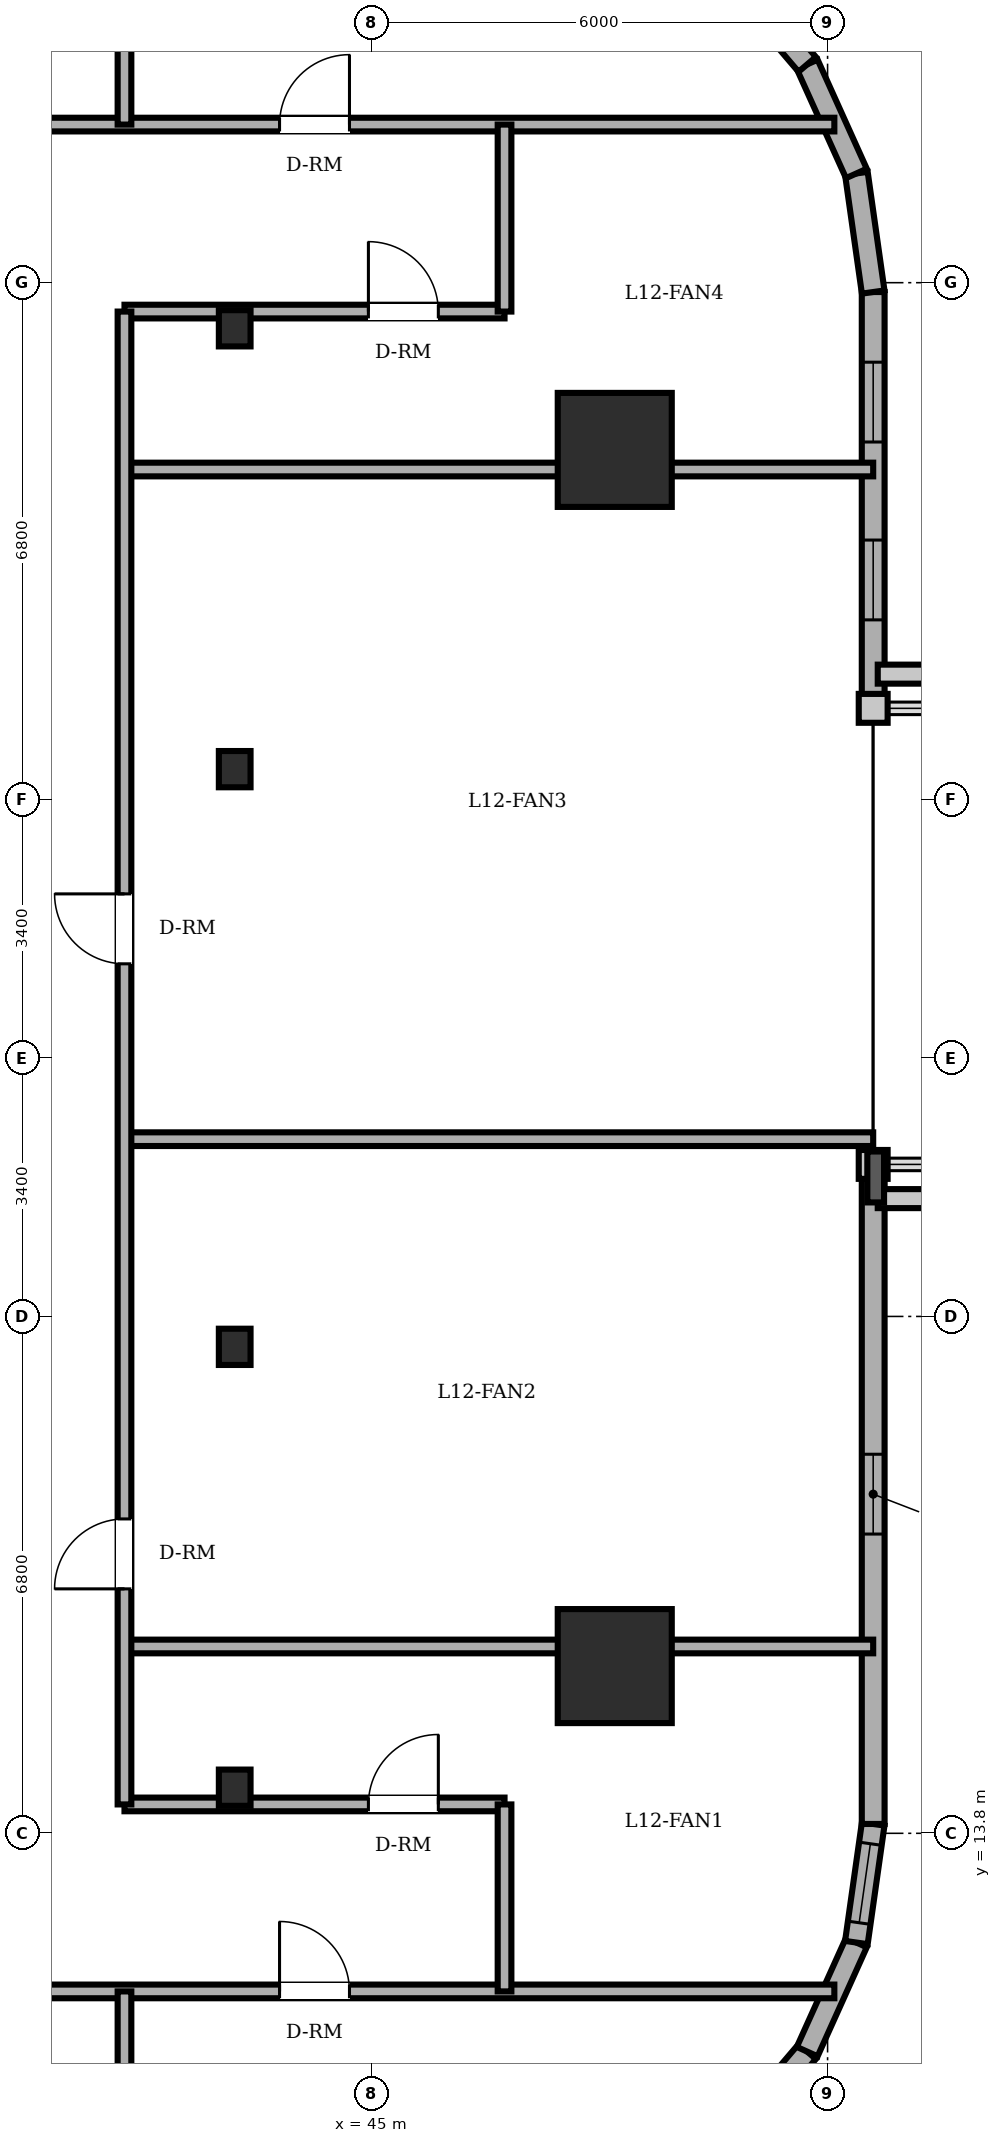
"""IFC4 building model, lengths in metres.
Left out: names, types, materials, properties, quantities, classifications, styles, units other than length and angle.
Written with IfcOpenShell. Run it as: python <this file> out.ifc"""

import sys

from ifc_helpers import new_model, si_unit, direction, frame, frame_2d, origin, origin_2d, place, context, subcontext, project, spatial, rectangle, circle, i_section, extrude, element, fill, save


model = new_model("IFC4")
c1 = context("Model", 3, precision=1e-05, world=origin(), true_north=direction((0.0, 1.0)))
c2 = subcontext(c1, "Body", "Model", "MODEL_VIEW")
j1 = project(units=[si_unit("LENGTHUNIT", "METRE"), si_unit("PLANEANGLEUNIT", "RADIAN")], contexts=[c1])
p1 = place(None, origin())
s1 = spatial("IfcSite", under=j1, at=p1, CompositionType="ELEMENT")
p2 = place(p1, origin())
s2 = spatial("IfcBuilding", under=s1, at=p2, CompositionType="ELEMENT")
p3 = place(p2, frame((0.0, 0.0, 46.8)))
s3 = spatial("IfcBuildingStorey", under=s2, at=p3, CompositionType="ELEMENT", Elevation=46.8)
for number, where, z_axis, x_axis in (
    (1, (48.2, 16.0, 0.0), (0.0, 0.0, 1.0), (1.0, 0.0, 0.0)),
    (2, (48.2, 32.0, 0.0), (0.0, 0.0, 1.0), (1.0, 0.0, 0.0)),
):
    element("IfcColumn", number, at=place(p3, frame(where, z_axis=z_axis, x_axis=x_axis)), inside=s3, PredefinedType="COLUMN", context=c2, shape_type="SweptSolid", body=[
        extrude(circle(Radius=0.75, at=origin_2d()), origin(), (0.0, 0.0, 1.0), 3.6),
    ])
for number, where, z_axis, x_axis in (
    (3, (43.2, 14.4, 0.0), (0.0, 0.0, 1.0), (1.0, 0.0, 0.0)),
    (4, (43.2, 20.2, 0.0), (0.0, 0.0, 1.0), (1.0, 0.0, 0.0)),
    (5, (43.2, 27.8, 0.0), (0.0, 0.0, 1.0), (1.0, 0.0, 0.0)),
    (6, (43.2, 33.6, 0.0), (0.0, 0.0, 1.0), (1.0, 0.0, 0.0)),
):
    element("IfcColumn", number, at=place(p3, frame(where, z_axis=z_axis, x_axis=x_axis)), inside=s3, PredefinedType="COLUMN", context=c2, shape_type="SweptSolid", body=[
        extrude(i_section(OverallWidth=0.417, OverallDepth=0.477, WebThickness=0.036, FlangeThickness=0.057, FilletRadius=0.015, at=origin_2d()), origin(), (0.0, 0.0, 1.0), 3.6),
    ])
p4 = place(p3, frame((49.71, 9.728, 0.0), z_axis=(0.0, 0.0, 1.0), x_axis=(0.648389989909, 0.7613083613, 0.0)))
e7 = element("IfcWall", 7, at=p4, inside=s3, PredefinedType="SOLIDWALL", context=c2, shape_type="SweptSolid", body=[
    extrude(rectangle(XDim=1.576, YDim=0.3, at=frame_2d((0.788, 0.0))), origin(), (0.0, 0.0, 1.0), 3.4),
])
p5 = place(p3, frame((50.732, 10.928, 0.0), z_axis=(0.0, 0.0, 1.0), x_axis=(0.410996558744, 0.911636895206, 0.0)))
e8 = element("IfcWall", 8, at=p5, inside=s3, PredefinedType="SOLIDWALL", context=c2, shape_type="SweptSolid", body=[
    extrude(rectangle(XDim=1.574, YDim=0.3, at=frame_2d((0.787, 0.0))), origin(), (0.0, 0.0, 1.0), 3.4),
])
p6 = place(p3, frame((51.379, 12.363, 0.0), z_axis=(0.0, 0.0, 1.0), x_axis=(0.140380048512, 0.990097693149, 0.0)))
e9 = element("IfcWall", 9, at=p6, inside=s3, PredefinedType="SOLIDWALL", context=c2, shape_type="SweptSolid", body=[
    extrude(rectangle(XDim=1.576, YDim=0.3, at=frame_2d((0.788, 0.0))), origin(), (0.0, 0.0, 1.0), 3.4),
])
p7 = place(p6, frame((0.263, 0.0, 0.85)))
e10 = element("IfcOpeningElement", 10, at=p7, cuts=e9, PredefinedType="OPENING", context=c2, shape_type="SweptSolid", body=[
    extrude(rectangle(XDim=1.05, YDim=1.55, at=frame_2d((0.525, 0.775))), frame((0.0, 0.16, 0.0), z_axis=(0.0, -1.0, 0.0), x_axis=(1.0, 0.0, 0.0)), (0.0, 0.0, 1.0), 0.32),
])
p8 = place(p3, frame((51.6, 13.923, 0.0), z_axis=(0.0, 0.0, 1.0), x_axis=(0.0, 1.0, 0.0)))
e11 = element("IfcWall", 11, at=p8, inside=s3, PredefinedType="SOLIDWALL", context=c2, shape_type="SweptSolid", body=[
    extrude(rectangle(XDim=8.677, YDim=0.3, at=frame_2d((4.338, 0.0))), origin(), (0.0, 0.0, 1.0), 3.4),
])
p9 = place(p8, frame((3.814, 0.0, 0.85)))
e12 = element("IfcOpeningElement", 12, at=p9, cuts=e11, PredefinedType="OPENING", context=c2, shape_type="SweptSolid", body=[
    extrude(rectangle(XDim=1.05, YDim=1.55, at=frame_2d((0.525, 0.775))), frame((0.0, 0.16, 0.0), z_axis=(0.0, -1.0, 0.0), x_axis=(1.0, 0.0, 0.0)), (0.0, 0.0, 1.0), 0.32),
])
p10 = place(p3, frame((51.6, 28.6, 0.0), z_axis=(0.0, 0.0, 1.0), x_axis=(0.0, 1.0, 0.0)))
e13 = element("IfcWall", 13, at=p10, inside=s3, PredefinedType="SOLIDWALL", context=c2, shape_type="SweptSolid", body=[
    extrude(rectangle(XDim=5.477, YDim=0.3, at=frame_2d((2.738, 0.0))), origin(), (0.0, 0.0, 1.0), 3.4),
])
p11 = place(p10, frame((1.164, 0.0, 0.85)))
e14 = element("IfcOpeningElement", 14, at=p11, cuts=e13, PredefinedType="OPENING", context=c2, shape_type="SweptSolid", body=[
    extrude(rectangle(XDim=1.05, YDim=1.55, at=frame_2d((0.525, 0.775))), frame((0.0, 0.16, 0.0), z_axis=(0.0, -1.0, 0.0), x_axis=(1.0, 0.0, 0.0)), (0.0, 0.0, 1.0), 0.32),
])
p12 = place(p10, frame((3.504, 0.0, 0.85)))
e15 = element("IfcOpeningElement", 15, at=p12, cuts=e13, PredefinedType="OPENING", context=c2, shape_type="SweptSolid", body=[
    extrude(rectangle(XDim=1.05, YDim=1.55, at=frame_2d((0.525, 0.775))), frame((0.0, 0.16, 0.0), z_axis=(0.0, -1.0, 0.0), x_axis=(1.0, 0.0, 0.0)), (0.0, 0.0, 1.0), 0.32),
])
p13 = place(p3, frame((51.6, 34.077, 0.0), z_axis=(0.0, 0.0, 1.0), x_axis=(-0.140380048512, 0.990097693149, 0.0)))
e16 = element("IfcWall", 16, at=p13, inside=s3, PredefinedType="SOLIDWALL", context=c2, shape_type="SweptSolid", body=[
    extrude(rectangle(XDim=1.576, YDim=0.3, at=frame_2d((0.788, 0.0))), origin(), (0.0, 0.0, 1.0), 3.4),
])
p14 = place(p3, frame((51.379, 35.637, 0.0), z_axis=(0.0, 0.0, 1.0), x_axis=(-0.410996558744, 0.911636895206, 0.0)))
e17 = element("IfcWall", 17, at=p14, inside=s3, PredefinedType="SOLIDWALL", context=c2, shape_type="SweptSolid", body=[
    extrude(rectangle(XDim=1.574, YDim=0.3, at=frame_2d((0.787, 0.0))), origin(), (0.0, 0.0, 1.0), 3.4),
])
p15 = place(p3, frame((50.732, 37.072, 0.0), z_axis=(0.0, 0.0, 1.0), x_axis=(-0.648389989909, 0.7613083613, 0.0)))
e18 = element("IfcWall", 18, at=p15, inside=s3, PredefinedType="SOLIDWALL", context=c2, shape_type="SweptSolid", body=[
    extrude(rectangle(XDim=1.576, YDim=0.3, at=frame_2d((0.788, 0.0))), origin(), (0.0, 0.0, 1.0), 3.4),
])
p16 = place(p3, frame((3.4, 11.72, 0.0), z_axis=(0.0, 0.0, 1.0), x_axis=(1.0, 0.0, 0.0)))
e19 = element("IfcWall", 19, at=p16, inside=s3, PredefinedType="PARTITIONING", context=c2, shape_type="SweptSolid", body=[
    extrude(rectangle(XDim=47.689, YDim=0.18, at=frame_2d((23.845, 0.0))), origin(), (0.0, 0.0, 1.0), 3.4),
])
p17 = place(p16, frame((21.24, 0.0, 0.0)))
e20 = element("IfcOpeningElement", 20, at=p17, cuts=e19, PredefinedType="OPENING", context=c2, shape_type="SweptSolid", body=[
    extrude(rectangle(XDim=0.92, YDim=2.1, at=frame_2d((0.46, 1.05))), frame((0.0, 0.1, 0.0), z_axis=(0.0, -1.0, 0.0), x_axis=(1.0, 0.0, 0.0)), (0.0, 0.0, 1.0), 0.2),
])
p18 = place(p16, frame((40.39, 0.0, 0.0)))
e21 = element("IfcOpeningElement", 21, at=p18, cuts=e19, PredefinedType="OPENING", context=c2, shape_type="SweptSolid", body=[
    extrude(rectangle(XDim=0.92, YDim=2.1, at=frame_2d((0.46, 1.05))), frame((0.0, 0.1, 0.0), z_axis=(0.0, -1.0, 0.0), x_axis=(1.0, 0.0, 0.0)), (0.0, 0.0, 1.0), 0.2),
])
p19 = place(p16, frame((10.74, 0.0, 0.0)))
e22 = element("IfcOpeningElement", 22, at=p19, cuts=e19, PredefinedType="OPENING", context=c2, shape_type="SweptSolid", body=[
    extrude(rectangle(XDim=0.92, YDim=2.1, at=frame_2d((0.46, 1.05))), frame((0.0, 0.1, 0.0), z_axis=(0.0, -1.0, 0.0), x_axis=(1.0, 0.0, 0.0)), (0.0, 0.0, 1.0), 0.2),
])
p20 = place(p16, frame((30.515, 0.0, 0.0)))
e23 = element("IfcOpeningElement", 23, at=p20, cuts=e19, PredefinedType="OPENING", context=c2, shape_type="SweptSolid", body=[
    extrude(rectangle(XDim=0.92, YDim=2.1, at=frame_2d((0.46, 1.05))), frame((0.0, 0.1, 0.0), z_axis=(0.0, -1.0, 0.0), x_axis=(1.0, 0.0, 0.0)), (0.0, 0.0, 1.0), 0.2),
])
p21 = place(p3, frame((41.75, 14.18, 0.0), z_axis=(0.0, 0.0, 1.0), x_axis=(1.0, 0.0, 0.0)))
e24 = element("IfcWall", 24, at=p21, inside=s3, PredefinedType="PARTITIONING", context=c2, shape_type="SweptSolid", body=[
    extrude(rectangle(XDim=5.0, YDim=0.18, at=frame_2d((2.5, 0.0))), origin(), (0.0, 0.0, 1.0), 2.782),
])
p22 = place(p21, frame((3.209, 0.0, 0.0)))
e25 = element("IfcOpeningElement", 25, at=p22, cuts=e24, PredefinedType="OPENING", context=c2, shape_type="SweptSolid", body=[
    extrude(rectangle(XDim=0.92, YDim=2.1, at=frame_2d((0.46, 1.05))), frame((0.0, 0.1, 0.0), z_axis=(0.0, -1.0, 0.0), x_axis=(1.0, 0.0, 0.0)), (0.0, 0.0, 1.0), 0.2),
])
p23 = place(p3, frame((41.75, 16.258, 0.0), z_axis=(0.0, 0.0, 1.0), x_axis=(1.0, 0.0, 0.0)))
e26 = element("IfcWall", 26, at=p23, inside=s3, PredefinedType="PARTITIONING", context=c2, shape_type="SweptSolid", body=[
    extrude(rectangle(XDim=9.85, YDim=0.18, at=frame_2d((4.925, 0.0))), origin(), (0.0, 0.0, 1.0), 3.142),
])
p24 = place(p3, frame((41.75, 22.932, 0.0), z_axis=(0.0, 0.0, 1.0), x_axis=(1.0, 0.0, 0.0)))
e27 = element("IfcWall", 27, at=p24, inside=s3, PredefinedType="PARTITIONING", context=c2, shape_type="SweptSolid", body=[
    extrude(rectangle(XDim=9.85, YDim=0.18, at=frame_2d((4.925, 0.0))), origin(), (0.0, 0.0, 1.0), 3.4),
])
p25 = place(p3, frame((41.75, 31.742, 0.0), z_axis=(0.0, 0.0, 1.0), x_axis=(1.0, 0.0, 0.0)))
e28 = element("IfcWall", 28, at=p25, inside=s3, PredefinedType="PARTITIONING", context=c2, shape_type="SweptSolid", body=[
    extrude(rectangle(XDim=9.85, YDim=0.18, at=frame_2d((4.925, 0.0))), origin(), (0.0, 0.0, 1.0), 3.142),
])
p26 = place(p3, frame((41.75, 33.82, 0.0), z_axis=(0.0, 0.0, 1.0), x_axis=(1.0, 0.0, 0.0)))
e29 = element("IfcWall", 29, at=p26, inside=s3, PredefinedType="PARTITIONING", context=c2, shape_type="SweptSolid", body=[
    extrude(rectangle(XDim=5.0, YDim=0.18, at=frame_2d((2.5, 0.0))), origin(), (0.0, 0.0, 1.0), 2.782),
])
p27 = place(p26, frame((3.209, 0.0, 0.0)))
e30 = element("IfcOpeningElement", 30, at=p27, cuts=e29, PredefinedType="OPENING", context=c2, shape_type="SweptSolid", body=[
    extrude(rectangle(XDim=0.92, YDim=2.1, at=frame_2d((0.46, 1.05))), frame((0.0, 0.1, 0.0), z_axis=(0.0, -1.0, 0.0), x_axis=(1.0, 0.0, 0.0)), (0.0, 0.0, 1.0), 0.2),
])
p28 = place(p3, frame((3.4, 36.28, 0.0), z_axis=(0.0, 0.0, 1.0), x_axis=(1.0, 0.0, 0.0)))
e31 = element("IfcWall", 31, at=p28, inside=s3, PredefinedType="PARTITIONING", context=c2, shape_type="SweptSolid", body=[
    extrude(rectangle(XDim=47.689, YDim=0.18, at=frame_2d((23.845, 0.0))), origin(), (0.0, 0.0, 1.0), 3.4),
])
p29 = place(p28, frame((21.05, 0.0, 0.0)))
e32 = element("IfcOpeningElement", 32, at=p29, cuts=e31, PredefinedType="OPENING", context=c2, shape_type="SweptSolid", body=[
    extrude(rectangle(XDim=0.9, YDim=2.1, at=frame_2d((0.45, 1.05))), frame((0.0, 0.1, 0.0), z_axis=(0.0, -1.0, 0.0), x_axis=(1.0, 0.0, 0.0)), (0.0, 0.0, 1.0), 0.2),
])
p30 = place(p28, frame((24.67, 0.0, 0.0)))
e33 = element("IfcOpeningElement", 33, at=p30, cuts=e31, PredefinedType="OPENING", context=c2, shape_type="SweptSolid", body=[
    extrude(rectangle(XDim=0.86, YDim=2.1, at=frame_2d((0.43, 1.05))), frame((0.0, 0.1, 0.0), z_axis=(0.0, -1.0, 0.0), x_axis=(1.0, 0.0, 0.0)), (0.0, 0.0, 1.0), 0.2),
])
p31 = place(p28, frame((40.39, 0.0, 0.0)))
e34 = element("IfcOpeningElement", 34, at=p31, cuts=e31, PredefinedType="OPENING", context=c2, shape_type="SweptSolid", body=[
    extrude(rectangle(XDim=0.92, YDim=2.1, at=frame_2d((0.46, 1.05))), frame((0.0, 0.1, 0.0), z_axis=(0.0, -1.0, 0.0), x_axis=(1.0, 0.0, 0.0)), (0.0, 0.0, 1.0), 0.2),
])
p32 = place(p28, frame((4.699, 0.0, 0.0)))
e35 = element("IfcOpeningElement", 35, at=p32, cuts=e31, PredefinedType="OPENING", context=c2, shape_type="SweptSolid", body=[
    extrude(rectangle(XDim=0.92, YDim=2.1, at=frame_2d((0.46, 1.05))), frame((0.0, 0.1, 0.0), z_axis=(0.0, -1.0, 0.0), x_axis=(1.0, 0.0, 0.0)), (0.0, 0.0, 1.0), 0.2),
])
p33 = place(p28, frame((13.298, 0.0, 0.0)))
e36 = element("IfcOpeningElement", 36, at=p33, cuts=e31, PredefinedType="OPENING", context=c2, shape_type="SweptSolid", body=[
    extrude(rectangle(XDim=0.92, YDim=2.1, at=frame_2d((0.46, 1.05))), frame((0.0, 0.1, 0.0), z_axis=(0.0, -1.0, 0.0), x_axis=(1.0, 0.0, 0.0)), (0.0, 0.0, 1.0), 0.2),
])
p34 = place(p28, frame((32.215, 0.0, 0.0)))
e37 = element("IfcOpeningElement", 37, at=p34, cuts=e31, PredefinedType="OPENING", context=c2, shape_type="SweptSolid", body=[
    extrude(rectangle(XDim=0.92, YDim=2.1, at=frame_2d((0.46, 1.05))), frame((0.0, 0.1, 0.0), z_axis=(0.0, -1.0, 0.0), x_axis=(1.0, 0.0, 0.0)), (0.0, 0.0, 1.0), 0.2),
])
p35 = place(p3, frame((41.75, 2.889, 0.0), z_axis=(0.0, 0.0, 1.0), x_axis=(0.0, 1.0, 0.0)))
e38 = element("IfcWall", 38, at=p35, inside=s3, PredefinedType="PARTITIONING", context=c2, shape_type="SweptSolid", body=[
    extrude(rectangle(XDim=8.831, YDim=0.18, at=frame_2d((4.416, 0.0))), origin(), (0.0, 0.0, 1.0), 2.782),
])
p36 = place(p3, frame((41.75, 14.18, 0.0), z_axis=(0.0, 0.0, 1.0), x_axis=(0.0, 1.0, 0.0)))
e39 = element("IfcWall", 39, at=p36, inside=s3, PredefinedType="PARTITIONING", context=c2, shape_type="SweptSolid", body=[
    extrude(rectangle(XDim=19.64, YDim=0.18, at=frame_2d((9.82, 0.0))), origin(), (0.0, 0.0, 1.0), 3.4),
])
p37 = place(p36, frame((2.836, 0.0, 0.0)))
e40 = element("IfcOpeningElement", 40, at=p37, cuts=e39, PredefinedType="OPENING", context=c2, shape_type="SweptSolid", body=[
    extrude(rectangle(XDim=0.92, YDim=2.1, at=frame_2d((0.46, 1.05))), frame((0.0, 0.1, 0.0), z_axis=(0.0, -1.0, 0.0), x_axis=(1.0, 0.0, 0.0)), (0.0, 0.0, 1.0), 0.2),
])
p38 = place(p36, frame((11.059, 0.0, 0.0)))
e41 = element("IfcOpeningElement", 41, at=p38, cuts=e39, PredefinedType="OPENING", context=c2, shape_type="SweptSolid", body=[
    extrude(rectangle(XDim=0.92, YDim=2.1, at=frame_2d((0.46, 1.05))), frame((0.0, 0.1, 0.0), z_axis=(0.0, -1.0, 0.0), x_axis=(1.0, 0.0, 0.0)), (0.0, 0.0, 1.0), 0.2),
])
p39 = place(p3, frame((41.75, 36.28, 0.0), z_axis=(0.0, 0.0, 1.0), x_axis=(0.0, 1.0, 0.0)))
e42 = element("IfcWall", 42, at=p39, inside=s3, PredefinedType="PARTITIONING", context=c2, shape_type="SweptSolid", body=[
    extrude(rectangle(XDim=8.831, YDim=0.18, at=frame_2d((4.416, 0.0))), origin(), (0.0, 0.0, 1.0), 2.782),
])
for number, where, z_axis, x_axis in (
    (43, (46.75, 11.72, 0.0), (0.0, 0.0, 1.0), (0.0, 1.0, 0.0)),
    (44, (46.75, 33.82, 0.0), (0.0, 0.0, 1.0), (0.0, 1.0, 0.0)),
):
    element("IfcWall", number, at=place(p3, frame(where, z_axis=z_axis, x_axis=x_axis)), inside=s3, PredefinedType="PARTITIONING", context=c2, shape_type="SweptSolid", body=[
        extrude(rectangle(XDim=2.46, YDim=0.18, at=frame_2d((1.23, 0.0))), origin(), (0.0, 0.0, 1.0), 3.4),
    ])
p40 = place(p9, origin())
e45 = element("IfcWindow", 45, at=p40, inside=s3, PartitioningType="SINGLE_PANEL", PredefinedType="WINDOW", context=c2, shape_type="SweptSolid", body=[
    extrude(rectangle(XDim=1.05, YDim=1.55, at=frame_2d((0.525, 0.775))), frame((0.0, 0.03, 0.0), z_axis=(0.0, -1.0, 0.0), x_axis=(1.0, 0.0, 0.0)), (0.0, 0.0, 1.0), 0.06),
])
fill(e12, e45)
p41 = place(p11, origin())
e46 = element("IfcWindow", 46, at=p41, inside=s3, PartitioningType="SINGLE_PANEL", PredefinedType="WINDOW", context=c2, shape_type="SweptSolid", body=[
    extrude(rectangle(XDim=1.05, YDim=1.55, at=frame_2d((0.525, 0.775))), frame((0.0, 0.03, 0.0), z_axis=(0.0, -1.0, 0.0), x_axis=(1.0, 0.0, 0.0)), (0.0, 0.0, 1.0), 0.06),
])
fill(e14, e46)
p42 = place(p7, origin())
e47 = element("IfcWindow", 47, at=p42, inside=s3, PartitioningType="SINGLE_PANEL", PredefinedType="WINDOW", context=c2, shape_type="SweptSolid", body=[
    extrude(rectangle(XDim=1.05, YDim=1.55, at=frame_2d((0.525, 0.775))), frame((0.0, 0.03, 0.0), z_axis=(0.0, -1.0, 0.0), x_axis=(1.0, 0.0, 0.0)), (0.0, 0.0, 1.0), 0.06),
])
fill(e10, e47)
p43 = place(p12, origin())
e48 = element("IfcWindow", 48, at=p43, inside=s3, PartitioningType="SINGLE_PANEL", PredefinedType="WINDOW", context=c2, shape_type="SweptSolid", body=[
    extrude(rectangle(XDim=1.05, YDim=1.55, at=frame_2d((0.525, 0.775))), frame((0.0, 0.03, 0.0), z_axis=(0.0, -1.0, 0.0), x_axis=(1.0, 0.0, 0.0)), (0.0, 0.0, 1.0), 0.06),
])
fill(e15, e48)
p44 = place(p22, origin())
e49 = element("IfcDoor", 49, at=p44, inside=s3, OperationType="SINGLE_SWING_RIGHT", PredefinedType="DOOR", context=c2, shape_type="SweptSolid", body=[
    extrude(rectangle(XDim=0.92, YDim=2.1, at=frame_2d((0.46, 1.05))), frame((0.0, 0.025, 0.0), z_axis=(0.0, -1.0, 0.0), x_axis=(1.0, 0.0, 0.0)), (0.0, 0.0, 1.0), 0.05),
])
fill(e25, e49)
p45 = place(p37, origin())
e50 = element("IfcDoor", 50, at=p45, inside=s3, OperationType="SINGLE_SWING_LEFT", PredefinedType="DOOR", context=c2, shape_type="SweptSolid", body=[
    extrude(rectangle(XDim=0.92, YDim=2.1, at=frame_2d((0.46, 1.05))), frame((0.0, 0.025, 0.0), z_axis=(0.0, -1.0, 0.0), x_axis=(1.0, 0.0, 0.0)), (0.0, 0.0, 1.0), 0.05),
])
fill(e40, e50)
p46 = place(p38, origin())
e51 = element("IfcDoor", 51, at=p46, inside=s3, OperationType="SINGLE_SWING_RIGHT", PredefinedType="DOOR", context=c2, shape_type="SweptSolid", body=[
    extrude(rectangle(XDim=0.92, YDim=2.1, at=frame_2d((0.46, 1.05))), frame((0.0, 0.025, 0.0), z_axis=(0.0, -1.0, 0.0), x_axis=(1.0, 0.0, 0.0)), (0.0, 0.0, 1.0), 0.05),
])
fill(e41, e51)
p47 = place(p27, origin())
e52 = element("IfcDoor", 52, at=p47, inside=s3, OperationType="SINGLE_SWING_LEFT", PredefinedType="DOOR", context=c2, shape_type="SweptSolid", body=[
    extrude(rectangle(XDim=0.92, YDim=2.1, at=frame_2d((0.46, 1.05))), frame((0.0, 0.025, 0.0), z_axis=(0.0, -1.0, 0.0), x_axis=(1.0, 0.0, 0.0)), (0.0, 0.0, 1.0), 0.05),
])
fill(e30, e52)
p48 = place(p31, origin())
e53 = element("IfcDoor", 53, at=p48, inside=s3, OperationType="SINGLE_SWING_RIGHT", PredefinedType="DOOR", context=c2, shape_type="SweptSolid", body=[
    extrude(rectangle(XDim=0.92, YDim=2.1, at=frame_2d((0.46, 1.05))), frame((0.0, 0.025, 0.0), z_axis=(0.0, -1.0, 0.0), x_axis=(1.0, 0.0, 0.0)), (0.0, 0.0, 1.0), 0.05),
])
fill(e34, e53)
p49 = place(p18, origin())
e54 = element("IfcDoor", 54, at=p49, inside=s3, OperationType="SINGLE_SWING_LEFT", PredefinedType="DOOR", context=c2, shape_type="SweptSolid", body=[
    extrude(rectangle(XDim=0.92, YDim=2.1, at=frame_2d((0.46, 1.05))), frame((0.0, 0.025, 0.0), z_axis=(0.0, -1.0, 0.0), x_axis=(1.0, 0.0, 0.0)), (0.0, 0.0, 1.0), 0.05),
])
fill(e21, e54)
save(model, sys.argv[1])
